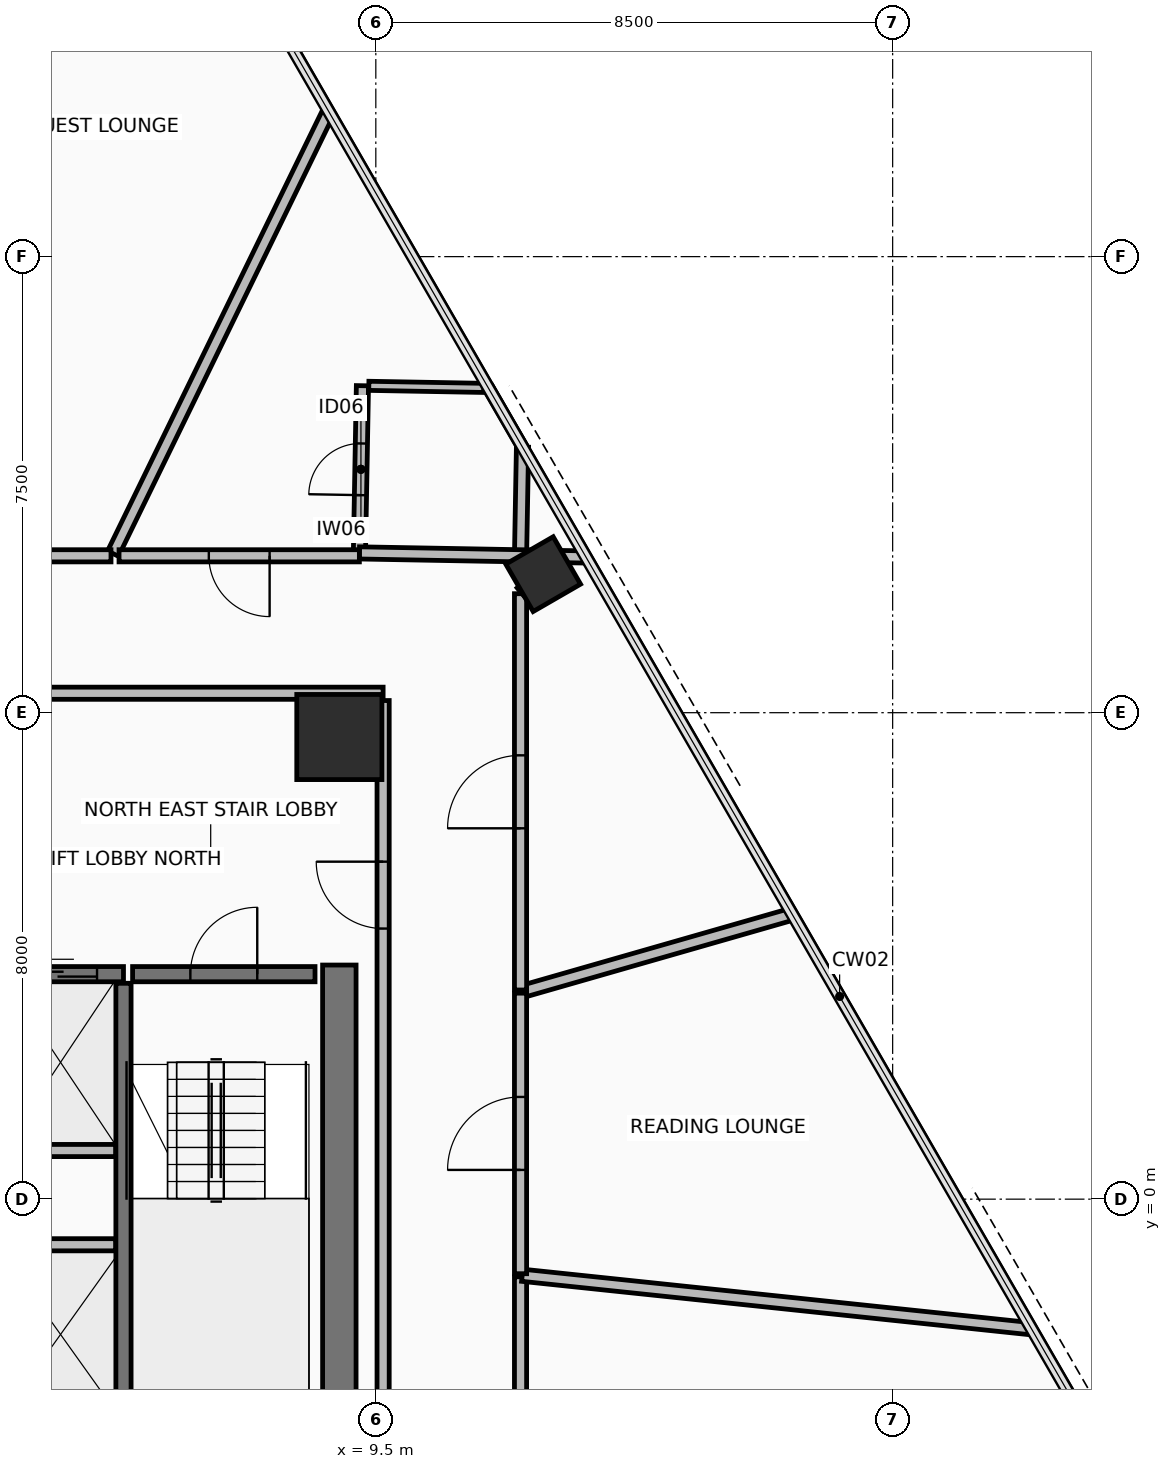
"""IFC4 building model, lengths in metres.
Left out: names, types, materials, properties, quantities, classifications, styles, units other than length and angle.
Written with IfcOpenShell. Run it as: python <this file> out.ifc"""

import sys

from ifc_helpers import new_model, si_unit, direction, frame, frame_2d, origin, origin_2d, place, context, subcontext, project, spatial, rectangle, hollow_rectangle, extrude, element, fill, save


model = new_model("IFC4")
c1 = context("Model", 3, precision=1e-05, world=origin(), true_north=direction((0.0, 1.0)))
c2 = subcontext(c1, "Body", "Model", "MODEL_VIEW")
j1 = project(units=[si_unit("LENGTHUNIT", "METRE"), si_unit("PLANEANGLEUNIT", "RADIAN")], contexts=[c1])
p1 = place(None, origin())
s1 = spatial("IfcSite", under=j1, at=p1, CompositionType="ELEMENT")
p2 = place(p1, origin())
s2 = spatial("IfcBuilding", under=s1, at=p2, CompositionType="ELEMENT")
p3 = place(p2, frame((0.0, 0.0, 45.45)))
s3 = spatial("IfcBuildingStorey", under=s2, at=p3, CompositionType="ELEMENT", Elevation=45.45)
p4 = place(p3, frame((8.9, 7.6, 0.0), z_axis=(0.0, 0.0, 1.0), x_axis=(1.0, 0.0, 0.0)))
e1 = element("IfcColumn", 1, at=p4, inside=s3, PredefinedType="COLUMN", context=c2, shape_type="SweptSolid", body=[
    extrude(rectangle(XDim=1.4, YDim=1.4, at=origin_2d()), origin(), (0.0, 0.0, 1.0), 3.4),
])
p5 = place(p3, frame((12.252, 10.279, 0.0), z_axis=(0.0, 0.0, 1.0), x_axis=(-0.500001511499, 0.866024531118, 0.0)))
e2 = element("IfcColumn", 2, at=p5, inside=s3, PredefinedType="COLUMN", context=c2, shape_type="SweptSolid", body=[
    extrude(hollow_rectangle(XDim=0.9, YDim=0.9, WallThickness=0.05, at=origin_2d()), origin(), (0.0, 0.0, 1.0), 3.4),
])
p6 = place(p3, frame((8.9, -6.85, 0.0), z_axis=(0.0, 0.0, 1.0), x_axis=(0.0, 1.0, 0.0)))
e3 = element("IfcWall", 3, at=p6, inside=s3, PredefinedType="SHEAR", context=c2, shape_type="SweptSolid", body=[
    extrude(rectangle(XDim=10.7, YDim=0.55, at=frame_2d((5.35, 0.0))), origin(), (0.0, 0.0, 1.0), 3.225),
])
p7 = place(p3, frame((9.62, 8.32, 0.0), z_axis=(0.0, 0.0, 1.0), x_axis=(-1.0, 0.0, 0.0)))
e4 = element("IfcWall", 4, at=p7, inside=s3, PredefinedType="PARTITIONING", context=c2, shape_type="SweptSolid", body=[
    extrude(rectangle(XDim=19.24, YDim=0.2, at=frame_2d((9.62, 0.0))), origin(), (0.0, 0.0, 1.0), 2.57),
])
p8 = place(p7, frame((15.02, 0.0, 0.0)))
e5 = element("IfcOpeningElement", 5, at=p8, cuts=e4, PredefinedType="OPENING", context=c2, shape_type="SweptSolid", body=[
    extrude(rectangle(XDim=0.9, YDim=2.1, at=frame_2d((0.45, 1.05))), frame((0.0, 0.11, 0.0), z_axis=(0.0, -1.0, 0.0), x_axis=(1.0, 0.0, 0.0)), (0.0, 0.0, 1.0), 0.22),
])
p9 = place(p3, frame((9.62, -8.2, 0.0), z_axis=(0.0, 0.0, 1.0), x_axis=(0.0, 1.0, 0.0)))
e6 = element("IfcWall", 6, at=p9, inside=s3, PredefinedType="PARTITIONING", context=c2, shape_type="SweptSolid", body=[
    extrude(rectangle(XDim=16.4, YDim=0.2, at=frame_2d((8.2, 0.0))), origin(), (0.0, 0.0, 1.0), 2.62),
])
p10 = place(p9, frame((12.65, 0.0, 0.0)))
e7 = element("IfcOpeningElement", 7, at=p10, cuts=e6, PredefinedType="OPENING", context=c2, shape_type="SweptSolid", body=[
    extrude(rectangle(XDim=1.1, YDim=2.15, at=frame_2d((0.55, 1.075))), frame((0.0, 0.11, 0.0), z_axis=(0.0, -1.0, 0.0), x_axis=(1.0, 0.0, 0.0)), (0.0, 0.0, 1.0), 0.22),
])
p11 = place(p3, frame((5.35, -3.75, 0.0), z_axis=(0.0, 0.0, 1.0), x_axis=(0.0, 1.0, 0.0)))
e8 = element("IfcWall", 8, at=p11, inside=s3, PredefinedType="SHEAR", context=c2, shape_type="SweptSolid", body=[
    extrude(rectangle(XDim=7.3, YDim=0.25, at=frame_2d((3.65, 0.0))), origin(), (0.0, 0.0, 1.0), 3.225),
])
p12 = place(p3, frame((5.5, 3.7, 0.0), z_axis=(0.0, 0.0, 1.0), x_axis=(1.0, 0.0, 0.0)))
e9 = element("IfcWall", 9, at=p12, inside=s3, PredefinedType="SHEAR", context=c2, shape_type="SweptSolid", body=[
    extrude(rectangle(XDim=3.0, YDim=0.25, at=frame_2d((1.5, 0.0))), origin(), (0.0, 0.0, 1.0), 3.225),
])
p13 = place(p12, frame((0.95, 0.0, 0.0)))
e10 = element("IfcOpeningElement", 10, at=p13, cuts=e9, PredefinedType="OPENING", context=c2, shape_type="SweptSolid", body=[
    extrude(rectangle(XDim=1.1, YDim=2.15, at=frame_2d((0.55, 1.075))), frame((0.0, 0.135, 0.0), z_axis=(0.0, -1.0, 0.0), x_axis=(1.0, 0.0, 0.0)), (0.0, 0.0, 1.0), 0.27),
])
p14 = place(p3, frame((3.28, 3.7, 0.0), z_axis=(0.0, 0.0, 1.0), x_axis=(1.0, 0.0, 0.0)))
e11 = element("IfcWall", 11, at=p14, inside=s3, PredefinedType="SHEAR", context=c2, shape_type="SweptSolid", body=[
    extrude(rectangle(XDim=2.07, YDim=0.25, at=frame_2d((1.035, 0.0))), origin(), (0.0, 0.0, 1.0), 3.225),
])
p15 = place(p14, frame((0.435, 0.0, 0.0)))
e12 = element("IfcOpeningElement", 12, at=p15, cuts=e11, PredefinedType="OPENING", context=c2, shape_type="SweptSolid", body=[
    extrude(rectangle(XDim=1.2, YDim=2.2, at=frame_2d((0.6, 1.1))), frame((0.0, 0.135, 0.0), z_axis=(0.0, -1.0, 0.0), x_axis=(1.0, 0.0, 0.0)), (0.0, 0.0, 1.0), 0.27),
])
for number, where, z_axis, x_axis in (
    (13, (3.385, 0.8, 0.0), (0.0, 0.0, 1.0), (1.0, 0.0, 0.0)),
    (14, (3.385, -0.75, 0.0), (0.0, 0.0, 1.0), (1.0, 0.0, 0.0)),
):
    element("IfcWall", number, at=place(p3, frame(where, z_axis=z_axis, x_axis=x_axis)), inside=s3, PredefinedType="PARTITIONING", context=c2, shape_type="SweptSolid", body=[
        extrude(rectangle(XDim=1.835, YDim=0.2, at=frame_2d((0.917, 0.0))), origin(), (0.0, 0.0, 1.0), 3.225),
    ])
p16 = place(p3, frame((9.23, 10.628, 0.0), z_axis=(0.0, 0.0, 1.0), x_axis=(0.017933538856, 0.999839181161, 0.0)))
e15 = element("IfcWall", 15, at=p16, inside=s3, PredefinedType="PARTITIONING", context=c2, shape_type="SweptSolid", body=[
    extrude(rectangle(XDim=2.75, YDim=0.2, at=frame_2d((1.375, 0.0))), origin(), (0.0, 0.0, 1.0), 2.82),
])
p17 = place(p16, frame((0.95, 0.0, 0.0)))
e16 = element("IfcOpeningElement", 16, at=p17, cuts=e15, PredefinedType="OPENING", context=c2, shape_type="SweptSolid", body=[
    extrude(rectangle(XDim=0.85, YDim=2.1, at=frame_2d((0.425, 1.05))), frame((0.0, 0.11, 0.0), z_axis=(0.0, -1.0, 0.0), x_axis=(1.0, 0.0, 0.0)), (0.0, 0.0, 1.0), 0.22),
])
p18 = place(p3, frame((9.385, 13.375, 0.0), z_axis=(0.0, 0.0, 1.0), x_axis=(0.999837856061, -0.018007264828, 0.0)))
e17 = element("IfcWall", 17, at=p18, inside=s3, PredefinedType="PARTITIONING", context=c2, shape_type="SweptSolid", body=[
    extrude(rectangle(XDim=1.966, YDim=0.15, at=frame_2d((0.983, 0.0))), origin(), (0.0, 0.0, 1.0), 2.42),
])
p19 = place(p3, frame((11.351, 13.34, 0.0), z_axis=(0.0, 0.0, 1.0), x_axis=(0.499973348067, -0.866040790738, 0.0)))
e18 = element("IfcWall", 18, at=p19, inside=s3, PredefinedType="PARTITIONING", context=c2, shape_type="SweptSolid", body=[
    extrude(rectangle(XDim=1.123, YDim=0.15, at=frame_2d((0.562, 0.0))), origin(), (0.0, 0.0, 1.0), 3.225),
])
p20 = place(p3, frame((11.912, 12.367, 0.0), z_axis=(0.0, 0.0, 1.0), x_axis=(-0.018027393678, -0.999837493334, 0.0)))
e19 = element("IfcWall", 19, at=p20, inside=s3, PredefinedType="PARTITIONING", context=c2, shape_type="SweptSolid", body=[
    extrude(rectangle(XDim=1.788, YDim=0.2, at=frame_2d((0.894, 0.0))), origin(), (0.0, 0.0, 1.0), 2.42),
])
p21 = place(p3, frame((12.955, 10.561, 0.0), z_axis=(0.0, 0.0, 1.0), x_axis=(-0.99983759803, 0.018021586122, 0.0)))
e20 = element("IfcWall", 20, at=p21, inside=s3, PredefinedType="PARTITIONING", context=c2, shape_type="SweptSolid", body=[
    extrude(rectangle(XDim=3.725, YDim=0.2, at=frame_2d((1.863, 0.0))), origin(), (0.0, 0.0, 1.0), 2.42),
])
p22 = place(p3, frame((16.346, 4.687, 0.0), z_axis=(0.0, 0.0, 1.0), x_axis=(-0.9612679101, -0.275615683539, 0.0)))
e21 = element("IfcWall", 21, at=p22, inside=s3, PredefinedType="PARTITIONING", context=c2, shape_type="SweptSolid", body=[
    extrude(rectangle(XDim=4.613, YDim=0.2, at=frame_2d((2.307, 0.0))), origin(), (0.0, 0.0, 1.0), 2.42),
])
p23 = place(p3, frame((11.88, 3.44, 0.0), z_axis=(0.0, 0.0, 1.0), x_axis=(0.0, 1.0, 0.0)))
e22 = element("IfcWall", 22, at=p23, inside=s3, PredefinedType="PARTITIONING", context=c2, shape_type="SweptSolid", body=[
    extrude(rectangle(XDim=6.517, YDim=0.2, at=frame_2d((3.259, 0.0))), origin(), (0.0, 0.0, 1.0), 2.62),
])
p24 = place(p23, frame((2.659, 0.0, 0.0)))
e23 = element("IfcOpeningElement", 23, at=p24, cuts=e22, PredefinedType="OPENING", context=c2, shape_type="SweptSolid", body=[
    extrude(rectangle(XDim=1.2, YDim=2.15, at=frame_2d((0.6, 1.075))), frame((0.0, 0.11, 0.0), z_axis=(0.0, -1.0, 0.0), x_axis=(1.0, 0.0, 0.0)), (0.0, 0.0, 1.0), 0.22),
])
p25 = place(p3, frame((11.889, 9.976, 0.0), z_axis=(0.0, 0.0, 1.0), x_axis=(0.765977080276, 0.642867881054, 0.0)))
e24 = element("IfcWall", 24, at=p25, inside=s3, PredefinedType="PARTITIONING", context=c2, shape_type="SweptSolid", body=[
    extrude(rectangle(XDim=0.76, YDim=0.2, at=frame_2d((0.38, 0.0))), origin(), (0.0, 0.0, 1.0), 2.42),
])
p26 = place(p3, frame((5.178, 10.616, 0.0), z_axis=(0.0, 0.0, 1.0), x_axis=(0.438357049566, 0.898800921838, 0.0)))
e25 = element("IfcWall", 25, at=p26, inside=s3, PredefinedType="PARTITIONING", context=c2, shape_type="SweptSolid", body=[
    extrude(rectangle(XDim=8.091, YDim=0.2, at=frame_2d((4.046, 0.0))), origin(), (0.0, 0.0, 1.0), 2.42),
])
p27 = place(p3, frame((9.229, 10.58, 0.0), z_axis=(0.0, 0.0, 1.0), x_axis=(-1.0, 0.0, 0.0)))
e26 = element("IfcWall", 26, at=p27, inside=s3, PredefinedType="PARTITIONING", context=c2, shape_type="SweptSolid", body=[
    extrude(rectangle(XDim=3.952, YDim=0.2, at=frame_2d((1.976, 0.0))), origin(), (0.0, 0.0, 1.0), 2.82),
])
p28 = place(p27, frame((1.476, 0.0, 0.0)))
e27 = element("IfcOpeningElement", 27, at=p28, cuts=e26, PredefinedType="OPENING", context=c2, shape_type="SweptSolid", body=[
    extrude(rectangle(XDim=1.0, YDim=2.15, at=frame_2d((0.5, 1.075))), frame((0.0, 0.11, 0.0), z_axis=(0.0, -1.0, 0.0), x_axis=(1.0, 0.0, 0.0)), (0.0, 0.0, 1.0), 0.22),
])
p29 = place(p3, frame((5.145, 10.58, 0.0), z_axis=(0.0, 0.0, 1.0), x_axis=(-1.0, 0.0, 0.0)))
e28 = element("IfcWall", 28, at=p29, inside=s3, PredefinedType="PARTITIONING", context=c2, shape_type="SweptSolid", body=[
    extrude(rectangle(XDim=4.749, YDim=0.2, at=frame_2d((2.375, 0.0))), origin(), (0.0, 0.0, 1.0), 2.57),
])
p30 = place(p29, frame((1.775, 0.0, 0.0)))
e29 = element("IfcOpeningElement", 29, at=p30, cuts=e28, PredefinedType="OPENING", context=c2, shape_type="SweptSolid", body=[
    extrude(rectangle(XDim=1.2, YDim=2.15, at=frame_2d((0.6, 1.075))), frame((0.0, 0.11, 0.0), z_axis=(0.0, -1.0, 0.0), x_axis=(1.0, 0.0, 0.0)), (0.0, 0.0, 1.0), 0.22),
])
p31 = place(p3, frame((11.88, -6.302, 0.0), z_axis=(0.0, 0.0, 1.0), x_axis=(0.0, 1.0, 0.0)))
e30 = element("IfcWall", 30, at=p31, inside=s3, PredefinedType="PARTITIONING", context=c2, shape_type="SweptSolid", body=[
    extrude(rectangle(XDim=5.025, YDim=0.2, at=frame_2d((2.513, 0.0))), origin(), (0.0, 0.0, 1.0), 3.225),
])
p32 = place(p31, frame((1.913, 0.0, 0.0)))
e31 = element("IfcOpeningElement", 31, at=p32, cuts=e30, PredefinedType="OPENING", context=c2, shape_type="SweptSolid", body=[
    extrude(rectangle(XDim=1.2, YDim=2.15, at=frame_2d((0.6, 1.075))), frame((0.0, 0.11, 0.0), z_axis=(0.0, -1.0, 0.0), x_axis=(1.0, 0.0, 0.0)), (0.0, 0.0, 1.0), 0.22),
])
p33 = place(p3, frame((11.908, -1.251, 0.0), z_axis=(0.0, 0.0, 1.0), x_axis=(0.994519920061, -0.104547255354, 0.0)))
e32 = element("IfcWall", 32, at=p33, inside=s3, PredefinedType="PARTITIONING", context=c2, shape_type="SweptSolid", body=[
    extrude(rectangle(XDim=8.409, YDim=0.2, at=frame_2d((4.205, 0.0))), origin(), (0.0, 0.0, 1.0), 2.42),
])
p34 = place(p3, frame((11.88, -1.226, 0.0), z_axis=(0.0, 0.0, 1.0), x_axis=(0.0, 1.0, 0.0)))
e33 = element("IfcWall", 33, at=p34, inside=s3, PredefinedType="PARTITIONING", context=c2, shape_type="SweptSolid", body=[
    extrude(rectangle(XDim=4.614, YDim=0.2, at=frame_2d((2.307, 0.0))), origin(), (0.0, 0.0, 1.0), 3.225),
])
p35 = place(p34, frame((1.707, 0.0, 0.0)))
e34 = element("IfcOpeningElement", 34, at=p35, cuts=e33, PredefinedType="OPENING", context=c2, shape_type="SweptSolid", body=[
    extrude(rectangle(XDim=1.2, YDim=2.15, at=frame_2d((0.6, 1.075))), frame((0.0, 0.11, 0.0), z_axis=(0.0, -1.0, 0.0), x_axis=(1.0, 0.0, 0.0)), (0.0, 0.0, 1.0), 0.22),
])
p36 = place(p10, frame((1.1, 0.0, 0.0), z_axis=(0.0, 0.0, 1.0), x_axis=(-1.0, 0.0, 0.0)))
e35 = element("IfcDoor", 35, at=p36, inside=s3, OperationType="SINGLE_SWING_LEFT", PredefinedType="DOOR", context=c2, shape_type="SweptSolid", body=[
    extrude(rectangle(XDim=1.1, YDim=2.15, at=frame_2d((0.55, 1.075))), frame((0.0, 0.025, 0.0), z_axis=(0.0, -1.0, 0.0), x_axis=(1.0, 0.0, 0.0)), (0.0, 0.0, 1.0), 0.05),
])
fill(e7, e35)
p37 = place(p13, frame((1.1, 0.0, 0.0), z_axis=(0.0, 0.0, 1.0), x_axis=(-1.0, 0.0, 0.0)))
e36 = element("IfcDoor", 36, at=p37, inside=s3, OperationType="SINGLE_SWING_LEFT", PredefinedType="DOOR", context=c2, shape_type="SweptSolid", body=[
    extrude(rectangle(XDim=1.1, YDim=2.15, at=frame_2d((0.55, 1.075))), frame((0.0, 0.025, 0.0), z_axis=(0.0, -1.0, 0.0), x_axis=(1.0, 0.0, 0.0)), (0.0, 0.0, 1.0), 0.05),
])
fill(e10, e36)
p38 = place(p15, origin())
e37 = element("IfcDoor", 37, at=p38, inside=s3, OperationType="SLIDING_TO_RIGHT", PredefinedType="DOOR", context=c2, shape_type="SweptSolid", body=[
    extrude(rectangle(XDim=1.2, YDim=2.2, at=frame_2d((0.6, 1.1))), frame((0.0, 0.025, 0.0), z_axis=(0.0, -1.0, 0.0), x_axis=(1.0, 0.0, 0.0)), (0.0, 0.0, 1.0), 0.05),
])
fill(e12, e37)
p39 = place(p17, origin())
e38 = element("IfcDoor", 38, at=p39, inside=s3, OperationType="SINGLE_SWING_RIGHT", PredefinedType="DOOR", context=c2, shape_type="SweptSolid", body=[
    extrude(rectangle(XDim=0.85, YDim=2.1, at=frame_2d((0.425, 1.05))), frame((0.0, 0.025, 0.0), z_axis=(0.0, -1.0, 0.0), x_axis=(1.0, 0.0, 0.0)), (0.0, 0.0, 1.0), 0.05),
])
fill(e16, e38)
p40 = place(p24, origin())
e39 = element("IfcDoor", 39, at=p40, inside=s3, OperationType="SINGLE_SWING_LEFT", PredefinedType="DOOR", context=c2, shape_type="SweptSolid", body=[
    extrude(rectangle(XDim=1.2, YDim=2.15, at=frame_2d((0.6, 1.075))), frame((0.0, 0.025, 0.0), z_axis=(0.0, -1.0, 0.0), x_axis=(1.0, 0.0, 0.0)), (0.0, 0.0, 1.0), 0.05),
])
fill(e23, e39)
p41 = place(p28, origin())
e40 = element("IfcDoor", 40, at=p41, inside=s3, OperationType="SINGLE_SWING_LEFT", PredefinedType="DOOR", context=c2, shape_type="SweptSolid", body=[
    extrude(rectangle(XDim=1.0, YDim=2.15, at=frame_2d((0.5, 1.075))), frame((0.0, 0.025, 0.0), z_axis=(0.0, -1.0, 0.0), x_axis=(1.0, 0.0, 0.0)), (0.0, 0.0, 1.0), 0.05),
])
fill(e27, e40)
p42 = place(p35, origin())
e41 = element("IfcDoor", 41, at=p42, inside=s3, OperationType="SINGLE_SWING_LEFT", PredefinedType="DOOR", context=c2, shape_type="SweptSolid", body=[
    extrude(rectangle(XDim=1.2, YDim=2.15, at=frame_2d((0.6, 1.075))), frame((0.0, 0.025, 0.0), z_axis=(0.0, -1.0, 0.0), x_axis=(1.0, 0.0, 0.0)), (0.0, 0.0, 1.0), 0.05),
])
fill(e34, e41)
save(model, sys.argv[1])
